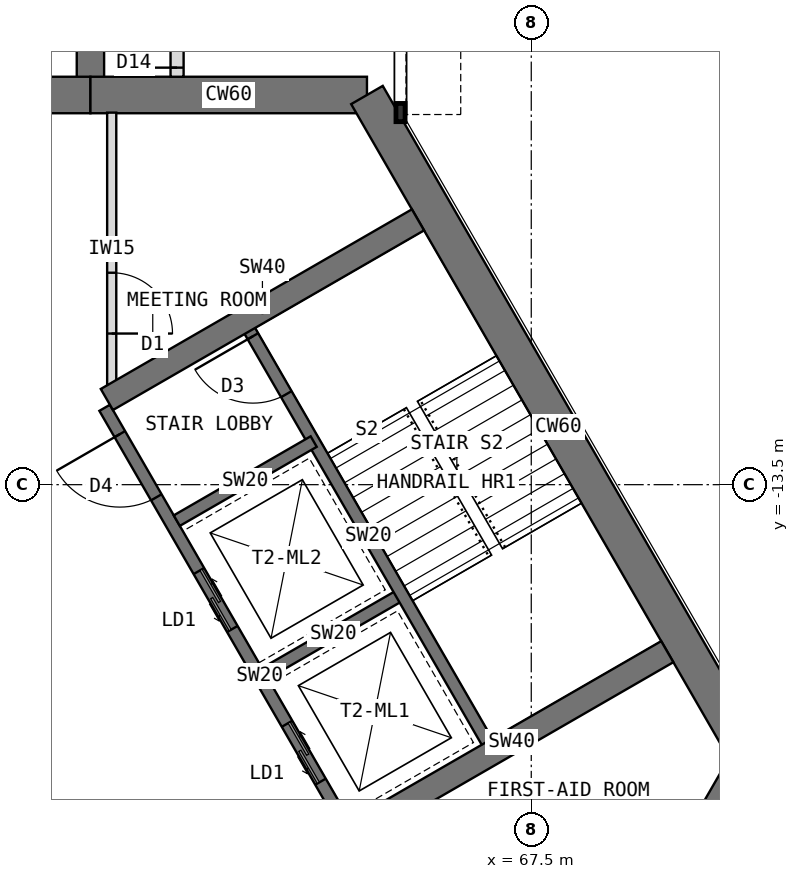
"""IFC4 building model, lengths in metres.
Left out: names, types, materials, properties, quantities, classifications, styles, units other than length and angle.
Written with IfcOpenShell. Run it as: python <this file> out.ifc"""

import sys

from ifc_helpers import new_model, si_unit, direction, frame, frame_2d, origin, place, context, subcontext, project, spatial, rectangle, extrude, element, fill, save


model = new_model("IFC4")
c1 = context("Model", 3, precision=1e-05, world=origin(), true_north=direction((0.0, 1.0)))
c2 = subcontext(c1, "Body", "Model", "MODEL_VIEW")
j1 = project(units=[si_unit("LENGTHUNIT", "METRE"), si_unit("PLANEANGLEUNIT", "RADIAN")], contexts=[c1])
p1 = place(None, origin())
s1 = spatial("IfcSite", under=j1, at=p1, CompositionType="ELEMENT")
p2 = place(p1, origin())
s2 = spatial("IfcBuilding", under=s1, at=p2, CompositionType="ELEMENT")
p3 = place(p2, frame((0.0, 0.0, 113.5)))
s3 = spatial("IfcBuildingStorey", under=s2, at=p3, CompositionType="ELEMENT", Elevation=113.5)
p4 = place(p3, frame((64.798, -7.092, 0.0), z_axis=(0.0, 0.0, 1.0), x_axis=(-1.0, 0.0, 0.0)))
e1 = element("IfcWall", 1, at=p4, inside=s3, PredefinedType="SHEAR", context=c2, shape_type="SweptSolid", body=[
    extrude(rectangle(XDim=4.548, YDim=0.6, at=frame_2d((2.274, 0.0))), origin(), (0.0, 0.0, 1.0), 4.0),
])
p5 = place(p3, frame((60.25, -7.092, 0.0), z_axis=(0.0, 0.0, 1.0), x_axis=(-1.0, 0.0, 0.0)))
e2 = element("IfcWall", 2, at=p5, inside=s3, PredefinedType="SHEAR", context=c2, shape_type="SweptSolid", body=[
    extrude(rectangle(XDim=3.5, YDim=0.6, at=frame_2d((1.75, 0.0))), origin(), (0.0, 0.0, 1.0), 4.0),
])
p6 = place(p5, frame((0.85, 0.0, 0.0)))
e3 = element("IfcOpeningElement", 3, at=p6, cuts=e2, PredefinedType="OPENING", context=c2, shape_type="SweptSolid", body=[
    extrude(rectangle(XDim=1.8, YDim=2.1, at=frame_2d((0.9, 1.05))), frame((0.0, 0.31, 0.0), z_axis=(0.0, -1.0, 0.0), x_axis=(1.0, 0.0, 0.0)), (0.0, 0.0, 1.0), 0.62),
])
p7 = place(p3, frame((68.822, -21.939, 0.0), z_axis=(0.0, 0.0, 1.0), x_axis=(0.500024481964, 0.866011268655, 0.0)))
e4 = element("IfcWall", 4, at=p7, inside=s3, PredefinedType="SHEAR", context=c2, shape_type="SweptSolid", body=[
    extrude(rectangle(XDim=4.548, YDim=0.6, at=frame_2d((2.274, 0.0))), origin(), (0.0, 0.0, 1.0), 4.0),
])
p8 = place(p3, frame((71.096, -18.0, 0.0), z_axis=(0.0, 0.0, 1.0), x_axis=(-0.500005998175, 0.866021940709, 0.0)))
e5 = element("IfcWall", 5, at=p8, inside=s3, PredefinedType="SHEAR", context=c2, shape_type="SweptSolid", body=[
    extrude(rectangle(XDim=12.596, YDim=0.6, at=frame_2d((6.298, 0.0))), origin(), (0.0, 0.0, 1.0), 4.0),
])
p9 = place(p3, frame((60.25, -7.092, 0.0), z_axis=(0.0, 0.0, 1.0), x_axis=(0.0, 1.0, 0.0)))
e6 = element("IfcWall", 6, at=p9, inside=s3, PredefinedType="SHEAR", context=c2, shape_type="SweptSolid", body=[
    extrude(rectangle(XDim=2.592, YDim=0.45, at=frame_2d((1.296, 0.0))), origin(), (0.0, 0.0, 1.0), 4.0),
])
p10 = place(p3, frame((64.484, -19.164, 0.0), z_axis=(0.0, 0.0, 1.0), x_axis=(-0.49999894854, 0.866026010844, 0.0)))
e7 = element("IfcWall", 7, at=p10, inside=s3, PredefinedType="SHEAR", context=c2, shape_type="SweptSolid", body=[
    extrude(rectangle(XDim=8.0, YDim=0.2, at=frame_2d((4.0, 0.0))), origin(), (0.0, 0.0, 1.0), 4.0),
])
p11 = place(p10, frame((6.3, 0.0, 0.0)))
e8 = element("IfcOpeningElement", 8, at=p11, cuts=e7, PredefinedType="OPENING", context=c2, shape_type="SweptSolid", body=[
    extrude(rectangle(XDim=1.2, YDim=2.1, at=frame_2d((0.6, 1.05))), frame((0.0, 0.11, 0.0), z_axis=(0.0, -1.0, 0.0), x_axis=(1.0, 0.0, 0.0)), (0.0, 0.0, 1.0), 0.22),
])
p12 = place(p10, frame((0.9, 0.0, 0.0)))
e9 = element("IfcOpeningElement", 9, at=p12, cuts=e7, PredefinedType="OPENING", context=c2, shape_type="SweptSolid", body=[
    extrude(rectangle(XDim=1.1, YDim=2.2, at=frame_2d((0.55, 1.1))), frame((0.0, 0.11, 0.0), z_axis=(0.0, -1.0, 0.0), x_axis=(1.0, 0.0, 0.0)), (0.0, 0.0, 1.0), 0.22),
])
p13 = place(p10, frame((3.8, 0.0, 0.0)))
e10 = element("IfcOpeningElement", 10, at=p13, cuts=e7, PredefinedType="OPENING", context=c2, shape_type="SweptSolid", body=[
    extrude(rectangle(XDim=1.1, YDim=2.2, at=frame_2d((0.55, 1.1))), frame((0.0, 0.11, 0.0), z_axis=(0.0, -1.0, 0.0), x_axis=(1.0, 0.0, 0.0)), (0.0, 0.0, 1.0), 0.22),
])
p14 = place(p3, frame((63.12, -16.603, 0.0), z_axis=(0.0, 0.0, 1.0), x_axis=(0.866062058628, 0.499936506574, 0.0)))
e11 = element("IfcWall", 11, at=p14, inside=s3, PredefinedType="SHEAR", context=c2, shape_type="SweptSolid", body=[
    extrude(rectangle(XDim=2.6, YDim=0.2, at=frame_2d((1.3, 0.0))), origin(), (0.0, 0.0, 1.0), 4.0),
])
p15 = place(p3, frame((61.67, -14.091, 0.0), z_axis=(0.0, 0.0, 1.0), x_axis=(0.86603858612, 0.49997716683, 0.0)))
e12 = element("IfcWall", 12, at=p15, inside=s3, PredefinedType="SHEAR", context=c2, shape_type="SweptSolid", body=[
    extrude(rectangle(XDim=2.6, YDim=0.2, at=frame_2d((1.3, 0.0))), origin(), (0.0, 0.0, 1.0), 4.0),
])
p16 = place(p3, frame((66.822, -17.814, 0.0), z_axis=(0.0, 0.0, 1.0), x_axis=(-0.49999894854, 0.866026010844, 0.0)))
e13 = element("IfcWall", 13, at=p16, inside=s3, PredefinedType="SHEAR", context=c2, shape_type="SweptSolid", body=[
    extrude(rectangle(XDim=8.0, YDim=0.2, at=frame_2d((4.0, 0.0))), origin(), (0.0, 0.0, 1.0), 4.0),
])
p17 = place(p16, frame((6.7, 0.0, 0.0)))
e14 = element("IfcOpeningElement", 14, at=p17, cuts=e13, PredefinedType="OPENING", context=c2, shape_type="SweptSolid", body=[
    extrude(rectangle(XDim=1.1, YDim=2.1, at=frame_2d((0.55, 1.05))), frame((0.0, 0.11, 0.0), z_axis=(0.0, -1.0, 0.0), x_axis=(1.0, 0.0, 0.0)), (0.0, 0.0, 1.0), 0.22),
])
p18 = place(p3, frame((60.52, -12.099, 0.0), z_axis=(0.0, 0.0, 1.0), x_axis=(0.866009424208, 0.500027676417, 0.0)))
e15 = element("IfcWall", 15, at=p18, inside=s3, PredefinedType="SHEAR", context=c2, shape_type="SweptSolid", body=[
    extrude(rectangle(XDim=5.908, YDim=0.4, at=frame_2d((2.954, 0.0))), origin(), (0.0, 0.0, 1.0), 4.0),
])
p19 = place(p3, frame((64.62, -19.201, 0.0), z_axis=(0.0, 0.0, 1.0), x_axis=(0.866027317282, 0.49999668571, 0.0)))
e16 = element("IfcWall", 16, at=p19, inside=s3, PredefinedType="SHEAR", context=c2, shape_type="SweptSolid", body=[
    extrude(rectangle(XDim=5.908, YDim=0.4, at=frame_2d((2.954, 0.0))), origin(), (0.0, 0.0, 1.0), 4.0),
])
p20 = place(p3, frame((61.675, -6.792, 0.0), z_axis=(0.0, 0.0, 1.0), x_axis=(0.0, 1.0, 0.0)))
e17 = element("IfcWall", 17, at=p20, inside=s3, PredefinedType="PARTITIONING", context=c2, shape_type="SweptSolid", body=[
    extrude(rectangle(XDim=2.4, YDim=0.215, at=frame_2d((1.2, 0.0))), origin(), (0.0, 0.0, 1.0), 3.8),
])
p21 = place(p20, frame((0.15, 0.0, 0.0)))
e18 = element("IfcOpeningElement", 18, at=p21, cuts=e17, PredefinedType="OPENING", context=c2, shape_type="SweptSolid", body=[
    extrude(rectangle(XDim=0.9, YDim=2.1, at=frame_2d((0.45, 1.05))), frame((0.0, 0.117, 0.0), z_axis=(0.0, -1.0, 0.0), x_axis=(1.0, 0.0, 0.0)), (0.0, 0.0, 1.0), 0.235),
])
p22 = place(p3, frame((60.6, -7.382, 0.0), z_axis=(0.0, 0.0, 1.0), x_axis=(0.0, -1.0, 0.0)))
e19 = element("IfcWall", 19, at=p22, inside=s3, PredefinedType="PARTITIONING", context=c2, shape_type="SweptSolid", body=[
    extrude(rectangle(XDim=4.476, YDim=0.15, at=frame_2d((2.238, 0.0))), origin(), (0.0, 0.0, 1.0), 3.8),
])
p23 = place(p22, frame((2.633, 0.0, 0.0)))
e20 = element("IfcOpeningElement", 20, at=p23, cuts=e19, PredefinedType="OPENING", context=c2, shape_type="SweptSolid", body=[
    extrude(rectangle(XDim=1.0, YDim=2.1, at=frame_2d((0.5, 1.05))), frame((0.0, 0.085, 0.0), z_axis=(0.0, -1.0, 0.0), x_axis=(1.0, 0.0, 0.0)), (0.0, 0.0, 1.0), 0.17),
])
p24 = place(p11, origin())
e21 = element("IfcDoor", 21, at=p24, inside=s3, OperationType="SINGLE_SWING_RIGHT", PredefinedType="DOOR", context=c2, shape_type="SweptSolid", body=[
    extrude(rectangle(XDim=1.2, YDim=2.1, at=frame_2d((0.6, 1.05))), frame((0.0, 0.025, 0.0), z_axis=(0.0, -1.0, 0.0), x_axis=(1.0, 0.0, 0.0)), (0.0, 0.0, 1.0), 0.05),
])
fill(e8, e21)
p25 = place(p12, origin())
e22 = element("IfcDoor", 22, at=p25, inside=s3, OperationType="DOUBLE_DOOR_SLIDING", PredefinedType="DOOR", context=c2, shape_type="SweptSolid", body=[
    extrude(rectangle(XDim=1.1, YDim=2.2, at=frame_2d((0.55, 1.1))), frame((0.0, 0.025, 0.0), z_axis=(0.0, -1.0, 0.0), x_axis=(1.0, 0.0, 0.0)), (0.0, 0.0, 1.0), 0.05),
])
fill(e9, e22)
p26 = place(p13, origin())
e23 = element("IfcDoor", 23, at=p26, inside=s3, OperationType="DOUBLE_DOOR_SLIDING", PredefinedType="DOOR", context=c2, shape_type="SweptSolid", body=[
    extrude(rectangle(XDim=1.1, YDim=2.2, at=frame_2d((0.55, 1.1))), frame((0.0, 0.025, 0.0), z_axis=(0.0, -1.0, 0.0), x_axis=(1.0, 0.0, 0.0)), (0.0, 0.0, 1.0), 0.05),
])
fill(e10, e23)
p27 = place(p17, origin())
e24 = element("IfcDoor", 24, at=p27, inside=s3, OperationType="SINGLE_SWING_RIGHT", PredefinedType="DOOR", context=c2, shape_type="SweptSolid", body=[
    extrude(rectangle(XDim=1.1, YDim=2.1, at=frame_2d((0.55, 1.05))), frame((0.0, 0.025, 0.0), z_axis=(0.0, -1.0, 0.0), x_axis=(1.0, 0.0, 0.0)), (0.0, 0.0, 1.0), 0.05),
])
fill(e14, e24)
p28 = place(p21, origin())
e25 = element("IfcDoor", 25, at=p28, inside=s3, OperationType="SINGLE_SWING_LEFT", PredefinedType="DOOR", context=c2, shape_type="SweptSolid", body=[
    extrude(rectangle(XDim=0.9, YDim=2.1, at=frame_2d((0.45, 1.05))), frame((0.0, 0.025, 0.0), z_axis=(0.0, -1.0, 0.0), x_axis=(1.0, 0.0, 0.0)), (0.0, 0.0, 1.0), 0.05),
])
fill(e18, e25)
p29 = place(p23, origin())
e26 = element("IfcDoor", 26, at=p29, inside=s3, OperationType="SINGLE_SWING_RIGHT", PredefinedType="DOOR", context=c2, shape_type="SweptSolid", body=[
    extrude(rectangle(XDim=1.0, YDim=2.1, at=frame_2d((0.5, 1.05))), frame((0.0, 0.025, 0.0), z_axis=(0.0, -1.0, 0.0), x_axis=(1.0, 0.0, 0.0)), (0.0, 0.0, 1.0), 0.05),
])
fill(e20, e26)
save(model, sys.argv[1])
